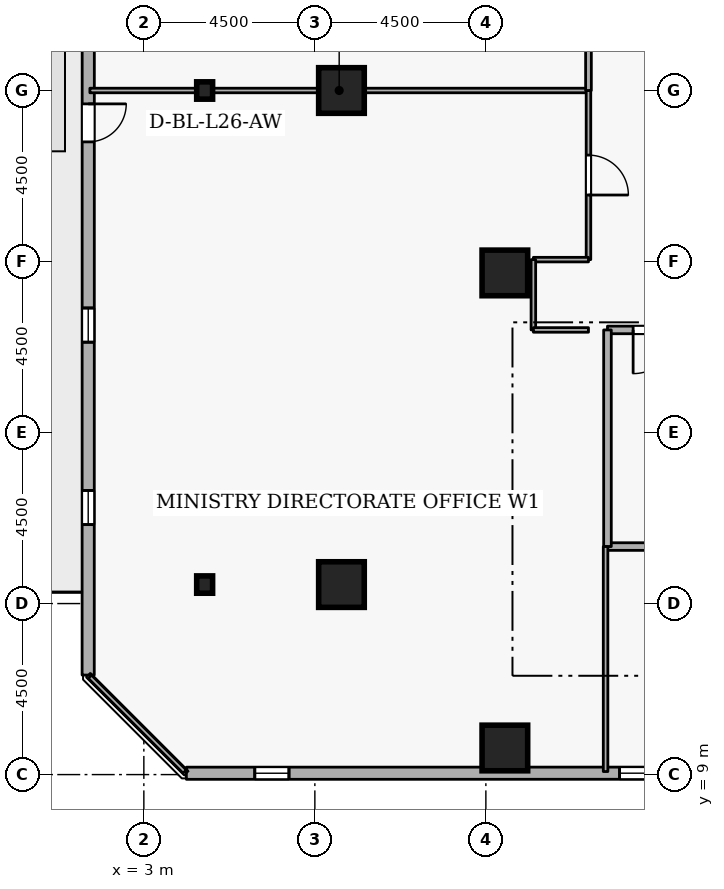
"""IFC4 building model, lengths in metres.
Left out: names, types, materials, properties, quantities, classifications, styles, units other than length and angle.
Written with IfcOpenShell. Run it as: python <this file> out.ifc"""

import sys

from ifc_helpers import new_model, si_unit, direction, frame, frame_2d, origin, origin_2d, place, context, subcontext, project, spatial, rectangle, i_section, extrude, element, fill, save


model = new_model("IFC4")
c1 = context("Model", 3, precision=1e-05, world=origin(), true_north=direction((0.0, 1.0)))
c2 = subcontext(c1, "Body", "Model", "MODEL_VIEW")
j1 = project(units=[si_unit("LENGTHUNIT", "METRE"), si_unit("PLANEANGLEUNIT", "RADIAN")], contexts=[c1])
p1 = place(None, origin())
s1 = spatial("IfcSite", under=j1, at=p1, CompositionType="ELEMENT")
p2 = place(p1, origin())
s2 = spatial("IfcBuilding", under=s1, at=p2, CompositionType="ELEMENT")
p3 = place(p2, frame((0.0, 0.0, 101.7)))
s3 = spatial("IfcBuildingStorey", under=s2, at=p3, CompositionType="ELEMENT", Elevation=101.7)
for number, where, z_axis, x_axis in (
    (1, (12.5, 9.7, 0.0), (0.0, 0.0, 1.0), (1.0, 0.0, 0.0)),
    (2, (8.2, 14.0, 0.0), (0.0, 0.0, 1.0), (1.0, 0.0, 0.0)),
    (3, (8.2, 27.0, 0.0), (0.0, 0.0, 1.0), (1.0, 0.0, 0.0)),
    (4, (12.5, 22.2, 0.0), (0.0, 0.0, 1.0), (1.0, 0.0, 0.0)),
):
    element("IfcColumn", number, at=place(p3, frame(where, z_axis=z_axis, x_axis=x_axis)), inside=s3, PredefinedType="COLUMN", context=c2, shape_type="SweptSolid", body=[
        extrude(rectangle(XDim=1.2, YDim=1.2, at=origin_2d()), origin(), (0.0, 0.0, 1.0), 3.6),
    ])
for number, where, z_axis, x_axis in (
    (5, (4.6, 14.0, 0.0), (0.0, 0.0, 1.0), (1.0, 0.0, 0.0)),
    (6, (4.6, 27.0, 0.0), (0.0, 0.0, 1.0), (1.0, 0.0, 0.0)),
):
    element("IfcColumn", number, at=place(p3, frame(where, z_axis=z_axis, x_axis=x_axis)), inside=s3, PredefinedType="COLUMN", context=c2, shape_type="SweptSolid", body=[
        extrude(i_section(OverallWidth=0.418, OverallDepth=0.456, WebThickness=0.042, FlangeThickness=0.067, FilletRadius=0.015, at=origin_2d()), origin(), (0.0, 0.0, 1.0), 3.6),
    ])
p4 = place(p3, frame((4.119, 9.035, 0.0), z_axis=(0.0, 0.0, 1.0), x_axis=(0.99999999315, 0.00011704845, 0.0)))
e7 = element("IfcWall", 7, at=p4, inside=s3, PredefinedType="STANDARD", context=c2, shape_type="SweptSolid", body=[
    extrude(rectangle(XDim=35.459, YDim=0.32, at=frame_2d((17.729, 0.0))), origin(), (0.0, 0.0, 1.0), 2.7),
])
p5 = place(p4, frame((1.8, 0.0, 0.72)))
e8 = element("IfcOpeningElement", 8, at=p5, cuts=e7, PredefinedType="OPENING", context=c2, shape_type="SweptSolid", body=[
    extrude(rectangle(XDim=0.9, YDim=1.75, at=frame_2d((0.45, 0.875))), frame((0.0, 0.17, 0.0), z_axis=(0.0, -1.0, 0.0), x_axis=(1.0, 0.0, 0.0)), (0.0, 0.0, 1.0), 0.34),
])
p6 = place(p4, frame((11.4, 0.0, 0.72)))
e9 = element("IfcOpeningElement", 9, at=p6, cuts=e7, PredefinedType="OPENING", context=c2, shape_type="SweptSolid", body=[
    extrude(rectangle(XDim=0.9, YDim=1.75, at=frame_2d((0.45, 0.875))), frame((0.0, 0.17, 0.0), z_axis=(0.0, -1.0, 0.0), x_axis=(1.0, 0.0, 0.0)), (0.0, 0.0, 1.0), 0.34),
])
p7 = place(p4, frame((16.2, 0.0, 0.72)))
e10 = element("IfcOpeningElement", 10, at=p7, cuts=e7, PredefinedType="OPENING", context=c2, shape_type="SweptSolid", body=[
    extrude(rectangle(XDim=0.9, YDim=1.75, at=frame_2d((0.45, 0.875))), frame((0.0, 0.17, 0.0), z_axis=(0.0, -1.0, 0.0), x_axis=(1.0, 0.0, 0.0)), (0.0, 0.0, 1.0), 0.34),
])
p8 = place(p4, frame((25.8, 0.0, 0.72)))
e11 = element("IfcOpeningElement", 11, at=p8, cuts=e7, PredefinedType="OPENING", context=c2, shape_type="SweptSolid", body=[
    extrude(rectangle(XDim=0.9, YDim=1.75, at=frame_2d((0.45, 0.875))), frame((0.0, 0.17, 0.0), z_axis=(0.0, -1.0, 0.0), x_axis=(1.0, 0.0, 0.0)), (0.0, 0.0, 1.0), 0.34),
])
p9 = place(p4, frame((30.6, 0.0, 0.72)))
e12 = element("IfcOpeningElement", 12, at=p9, cuts=e7, PredefinedType="OPENING", context=c2, shape_type="SweptSolid", body=[
    extrude(rectangle(XDim=0.9, YDim=1.75, at=frame_2d((0.45, 0.875))), frame((0.0, 0.17, 0.0), z_axis=(0.0, -1.0, 0.0), x_axis=(1.0, 0.0, 0.0)), (0.0, 0.0, 1.0), 0.34),
])
p10 = place(p3, frame((1.54, 47.077, 0.0), z_axis=(0.0, 0.0, 1.0), x_axis=(-0.00011704845, -0.99999999315, 0.0)))
e13 = element("IfcWall", 13, at=p10, inside=s3, PredefinedType="STANDARD", context=c2, shape_type="SweptSolid", body=[
    extrude(rectangle(XDim=35.459, YDim=0.32, at=frame_2d((17.729, 0.0))), origin(), (0.0, 0.0, 1.0), 2.7),
])
p11 = place(p10, frame((20.429, 0.0, 0.0)))
e14 = element("IfcOpeningElement", 14, at=p11, cuts=e13, PredefinedType="OPENING", context=c2, shape_type="SweptSolid", body=[
    extrude(rectangle(XDim=1.0, YDim=2.08, at=frame_2d((0.5, 1.04))), frame((0.0, 0.17, 0.0), z_axis=(0.0, -1.0, 0.0), x_axis=(1.0, 0.0, 0.0)), (0.0, 0.0, 1.0), 0.34),
])
p12 = place(p10, frame((1.8, 0.0, 0.72)))
e15 = element("IfcOpeningElement", 15, at=p12, cuts=e13, PredefinedType="OPENING", context=c2, shape_type="SweptSolid", body=[
    extrude(rectangle(XDim=0.9, YDim=1.75, at=frame_2d((0.45, 0.875))), frame((0.0, 0.17, 0.0), z_axis=(0.0, -1.0, 0.0), x_axis=(1.0, 0.0, 0.0)), (0.0, 0.0, 1.0), 0.34),
])
p13 = place(p10, frame((6.6, 0.0, 0.72)))
e16 = element("IfcOpeningElement", 16, at=p13, cuts=e13, PredefinedType="OPENING", context=c2, shape_type="SweptSolid", body=[
    extrude(rectangle(XDim=0.9, YDim=1.75, at=frame_2d((0.45, 0.875))), frame((0.0, 0.17, 0.0), z_axis=(0.0, -1.0, 0.0), x_axis=(1.0, 0.0, 0.0)), (0.0, 0.0, 1.0), 0.34),
])
p14 = place(p10, frame((11.4, 0.0, 0.72)))
e17 = element("IfcOpeningElement", 17, at=p14, cuts=e13, PredefinedType="OPENING", context=c2, shape_type="SweptSolid", body=[
    extrude(rectangle(XDim=0.9, YDim=1.75, at=frame_2d((0.45, 0.875))), frame((0.0, 0.17, 0.0), z_axis=(0.0, -1.0, 0.0), x_axis=(1.0, 0.0, 0.0)), (0.0, 0.0, 1.0), 0.34),
])
p15 = place(p10, frame((16.2, 0.0, 0.72)))
e18 = element("IfcOpeningElement", 18, at=p15, cuts=e13, PredefinedType="OPENING", context=c2, shape_type="SweptSolid", body=[
    extrude(rectangle(XDim=0.9, YDim=1.75, at=frame_2d((0.45, 0.875))), frame((0.0, 0.17, 0.0), z_axis=(0.0, -1.0, 0.0), x_axis=(1.0, 0.0, 0.0)), (0.0, 0.0, 1.0), 0.34),
])
p16 = place(p10, frame((25.8, 0.0, 0.72)))
e19 = element("IfcOpeningElement", 19, at=p16, cuts=e13, PredefinedType="OPENING", context=c2, shape_type="SweptSolid", body=[
    extrude(rectangle(XDim=0.9, YDim=1.75, at=frame_2d((0.45, 0.875))), frame((0.0, 0.17, 0.0), z_axis=(0.0, -1.0, 0.0), x_axis=(1.0, 0.0, 0.0)), (0.0, 0.0, 1.0), 0.34),
])
p17 = place(p10, frame((30.6, 0.0, 0.72)))
e20 = element("IfcOpeningElement", 20, at=p17, cuts=e13, PredefinedType="OPENING", context=c2, shape_type="SweptSolid", body=[
    extrude(rectangle(XDim=0.9, YDim=1.75, at=frame_2d((0.45, 0.875))), frame((0.0, 0.17, 0.0), z_axis=(0.0, -1.0, 0.0), x_axis=(1.0, 0.0, 0.0)), (0.0, 0.0, 1.0), 0.34),
])
p18 = place(p3, frame((15.2, 15.0, 0.0), z_axis=(0.0, 0.0, 1.0), x_axis=(1.0, 0.0, 0.0)))
e21 = element("IfcWall", 21, at=p18, inside=s3, PredefinedType="STANDARD", context=c2, shape_type="SweptSolid", body=[
    extrude(rectangle(XDim=2.5, YDim=0.2, at=frame_2d((1.25, 0.0))), origin(), (0.0, 0.0, 1.0), 3.34),
])
p19 = place(p3, frame((17.7, 20.7, 0.0), z_axis=(0.0, 0.0, 1.0), x_axis=(-1.0, 0.0, 0.0)))
e22 = element("IfcWall", 22, at=p19, inside=s3, PredefinedType="STANDARD", context=c2, shape_type="SweptSolid", body=[
    extrude(rectangle(XDim=2.5, YDim=0.2, at=frame_2d((1.25, 0.0))), origin(), (0.0, 0.0, 1.0), 3.34),
])
p20 = place(p19, frame((0.675, 0.0, 0.0)))
e23 = element("IfcOpeningElement", 23, at=p20, cuts=e22, PredefinedType="OPENING", context=c2, shape_type="SweptSolid", body=[
    extrude(rectangle(XDim=1.15, YDim=2.1, at=frame_2d((0.575, 1.05))), frame((0.0, 0.11, 0.0), z_axis=(0.0, -1.0, 0.0), x_axis=(1.0, 0.0, 0.0)), (0.0, 0.0, 1.0), 0.22),
])
p21 = place(p3, frame((15.2, 20.7, 0.0), z_axis=(0.0, 0.0, 1.0), x_axis=(0.0, -1.0, 0.0)))
e24 = element("IfcWall", 24, at=p21, inside=s3, PredefinedType="STANDARD", context=c2, shape_type="SweptSolid", body=[
    extrude(rectangle(XDim=5.7, YDim=0.2, at=frame_2d((2.85, 0.0))), origin(), (0.0, 0.0, 1.0), 3.34),
])
p22 = place(p3, frame((1.58, 27.0, 0.0), z_axis=(0.0, 0.0, 1.0), x_axis=(1.0, 0.0, 0.0)))
e25 = element("IfcWall", 25, at=p22, inside=s3, PredefinedType="PARTITIONING", context=c2, shape_type="SweptSolid", body=[
    extrude(rectangle(XDim=13.12, YDim=0.12, at=frame_2d((6.56, 0.0))), origin(), (0.0, 0.0, 1.0), 2.878),
])
p23 = place(p3, frame((14.7, 27.0, 0.0), z_axis=(0.0, 0.0, 1.0), x_axis=(0.0, -1.0, 0.0)))
e26 = element("IfcWall", 26, at=p23, inside=s3, PredefinedType="PARTITIONING", context=c2, shape_type="SweptSolid", body=[
    extrude(rectangle(XDim=4.45, YDim=0.12, at=frame_2d((2.225, 0.0))), origin(), (0.0, 0.0, 1.0), 3.34),
])
p24 = place(p23, frame((1.7, 0.0, 0.0)))
e27 = element("IfcOpeningElement", 27, at=p24, cuts=e26, PredefinedType="OPENING", context=c2, shape_type="SweptSolid", body=[
    extrude(rectangle(XDim=1.05, YDim=2.1, at=frame_2d((0.525, 1.05))), frame((0.0, 0.07, 0.0), z_axis=(0.0, -1.0, 0.0), x_axis=(1.0, 0.0, 0.0)), (0.0, 0.0, 1.0), 0.14),
])
p25 = place(p3, frame((14.7, 22.55, 0.0), z_axis=(0.0, 0.0, 1.0), x_axis=(-1.0, 0.0, 0.0)))
e28 = element("IfcWall", 28, at=p25, inside=s3, PredefinedType="PARTITIONING", context=c2, shape_type="SweptSolid", body=[
    extrude(rectangle(XDim=1.45, YDim=0.12, at=frame_2d((0.725, 0.0))), origin(), (0.0, 0.0, 1.0), 3.34),
])
p26 = place(p3, frame((13.25, 22.55, 0.0), z_axis=(0.0, 0.0, 1.0), x_axis=(0.0, -1.0, 0.0)))
e29 = element("IfcWall", 29, at=p26, inside=s3, PredefinedType="PARTITIONING", context=c2, shape_type="SweptSolid", body=[
    extrude(rectangle(XDim=1.85, YDim=0.12, at=frame_2d((0.925, 0.0))), origin(), (0.0, 0.0, 1.0), 3.34),
])
p27 = place(p3, frame((13.25, 20.7, 0.0), z_axis=(0.0, 0.0, 1.0), x_axis=(1.0, 0.0, 0.0)))
e30 = element("IfcWall", 30, at=p27, inside=s3, PredefinedType="PARTITIONING", context=c2, shape_type="SweptSolid", body=[
    extrude(rectangle(XDim=1.45, YDim=0.12, at=frame_2d((0.725, 0.0))), origin(), (0.0, 0.0, 1.0), 3.34),
])
p28 = place(p3, frame((15.15, 15.0, 0.0), z_axis=(0.0, 0.0, 1.0), x_axis=(0.0, -1.0, 0.0)))
e31 = element("IfcWall", 31, at=p28, inside=s3, PredefinedType="PARTITIONING", context=c2, shape_type="SweptSolid", body=[
    extrude(rectangle(XDim=5.92, YDim=0.12, at=frame_2d((2.96, 0.0))), origin(), (0.0, 0.0, 1.0), 3.34),
])
p29 = place(p3, frame((4.075, 9.08, 0.0), z_axis=(0.0, 0.0, 1.0), x_axis=(-0.707106781187, 0.707106781187, 0.0)))
e32 = element("IfcWall", 32, at=p29, inside=s3, PredefinedType="PARTITIONING", context=c2, shape_type="SweptSolid", body=[
    extrude(rectangle(XDim=3.528, YDim=0.12, at=frame_2d((1.764, 0.0))), origin(), (0.0, 0.0, 1.0), 3.34),
])
p30 = place(p3, frame((14.7, 31.45, 0.0), z_axis=(0.0, 0.0, 1.0), x_axis=(0.0, -1.0, 0.0)))
e33 = element("IfcWall", 33, at=p30, inside=s3, PredefinedType="PARTITIONING", context=c2, shape_type="SweptSolid", body=[
    extrude(rectangle(XDim=4.45, YDim=0.15, at=frame_2d((2.225, 0.0))), origin(), (0.0, 0.0, 1.0), 3.34),
])
p31 = place(p30, frame((1.575, 0.0, 0.0)))
e34 = element("IfcOpeningElement", 34, at=p31, cuts=e33, PredefinedType="OPENING", context=c2, shape_type="SweptSolid", body=[
    extrude(rectangle(XDim=1.3, YDim=2.12, at=frame_2d((0.65, 1.06))), frame((0.0, 0.085, 0.0), z_axis=(0.0, -1.0, 0.0), x_axis=(1.0, 0.0, 0.0)), (0.0, 0.0, 1.0), 0.17),
])
p32 = place(p5, origin())
e35 = element("IfcWindow", 35, at=p32, inside=s3, PartitioningType="SINGLE_PANEL", PredefinedType="WINDOW", context=c2, shape_type="SweptSolid", body=[
    extrude(rectangle(XDim=0.9, YDim=1.75, at=frame_2d((0.45, 0.875))), frame((0.0, 0.03, 0.0), z_axis=(0.0, -1.0, 0.0), x_axis=(1.0, 0.0, 0.0)), (0.0, 0.0, 1.0), 0.06),
])
fill(e8, e35)
p33 = place(p6, origin())
e36 = element("IfcWindow", 36, at=p33, inside=s3, PartitioningType="SINGLE_PANEL", PredefinedType="WINDOW", context=c2, shape_type="SweptSolid", body=[
    extrude(rectangle(XDim=0.9, YDim=1.75, at=frame_2d((0.45, 0.875))), frame((0.0, 0.03, 0.0), z_axis=(0.0, -1.0, 0.0), x_axis=(1.0, 0.0, 0.0)), (0.0, 0.0, 1.0), 0.06),
])
fill(e9, e36)
p34 = place(p11, origin())
e37 = element("IfcDoor", 37, at=p34, inside=s3, OperationType="SINGLE_SWING_LEFT", PredefinedType="DOOR", context=c2, shape_type="SweptSolid", body=[
    extrude(rectangle(XDim=1.0, YDim=2.08, at=frame_2d((0.5, 1.04))), frame((0.0, 0.025, 0.0), z_axis=(0.0, -1.0, 0.0), x_axis=(1.0, 0.0, 0.0)), (0.0, 0.0, 1.0), 0.05),
])
fill(e14, e37)
p35 = place(p16, origin())
e38 = element("IfcWindow", 38, at=p35, inside=s3, PartitioningType="SINGLE_PANEL", PredefinedType="WINDOW", context=c2, shape_type="SweptSolid", body=[
    extrude(rectangle(XDim=0.9, YDim=1.75, at=frame_2d((0.45, 0.875))), frame((0.0, 0.03, 0.0), z_axis=(0.0, -1.0, 0.0), x_axis=(1.0, 0.0, 0.0)), (0.0, 0.0, 1.0), 0.06),
])
fill(e19, e38)
p36 = place(p17, origin())
e39 = element("IfcWindow", 39, at=p36, inside=s3, PartitioningType="SINGLE_PANEL", PredefinedType="WINDOW", context=c2, shape_type="SweptSolid", body=[
    extrude(rectangle(XDim=0.9, YDim=1.75, at=frame_2d((0.45, 0.875))), frame((0.0, 0.03, 0.0), z_axis=(0.0, -1.0, 0.0), x_axis=(1.0, 0.0, 0.0)), (0.0, 0.0, 1.0), 0.06),
])
fill(e20, e39)
p37 = place(p20, origin())
e40 = element("IfcDoor", 40, at=p37, inside=s3, OperationType="SINGLE_SWING_RIGHT", PredefinedType="DOOR", context=c2, shape_type="SweptSolid", body=[
    extrude(rectangle(XDim=1.15, YDim=2.1, at=frame_2d((0.575, 1.05))), frame((0.0, 0.025, 0.0), z_axis=(0.0, -1.0, 0.0), x_axis=(1.0, 0.0, 0.0)), (0.0, 0.0, 1.0), 0.05),
])
fill(e23, e40)
p38 = place(p24, origin())
e41 = element("IfcDoor", 41, at=p38, inside=s3, OperationType="SINGLE_SWING_RIGHT", PredefinedType="DOOR", context=c2, shape_type="SweptSolid", body=[
    extrude(rectangle(XDim=1.05, YDim=2.1, at=frame_2d((0.525, 1.05))), frame((0.0, 0.025, 0.0), z_axis=(0.0, -1.0, 0.0), x_axis=(1.0, 0.0, 0.0)), (0.0, 0.0, 1.0), 0.05),
])
fill(e27, e41)
save(model, sys.argv[1])
